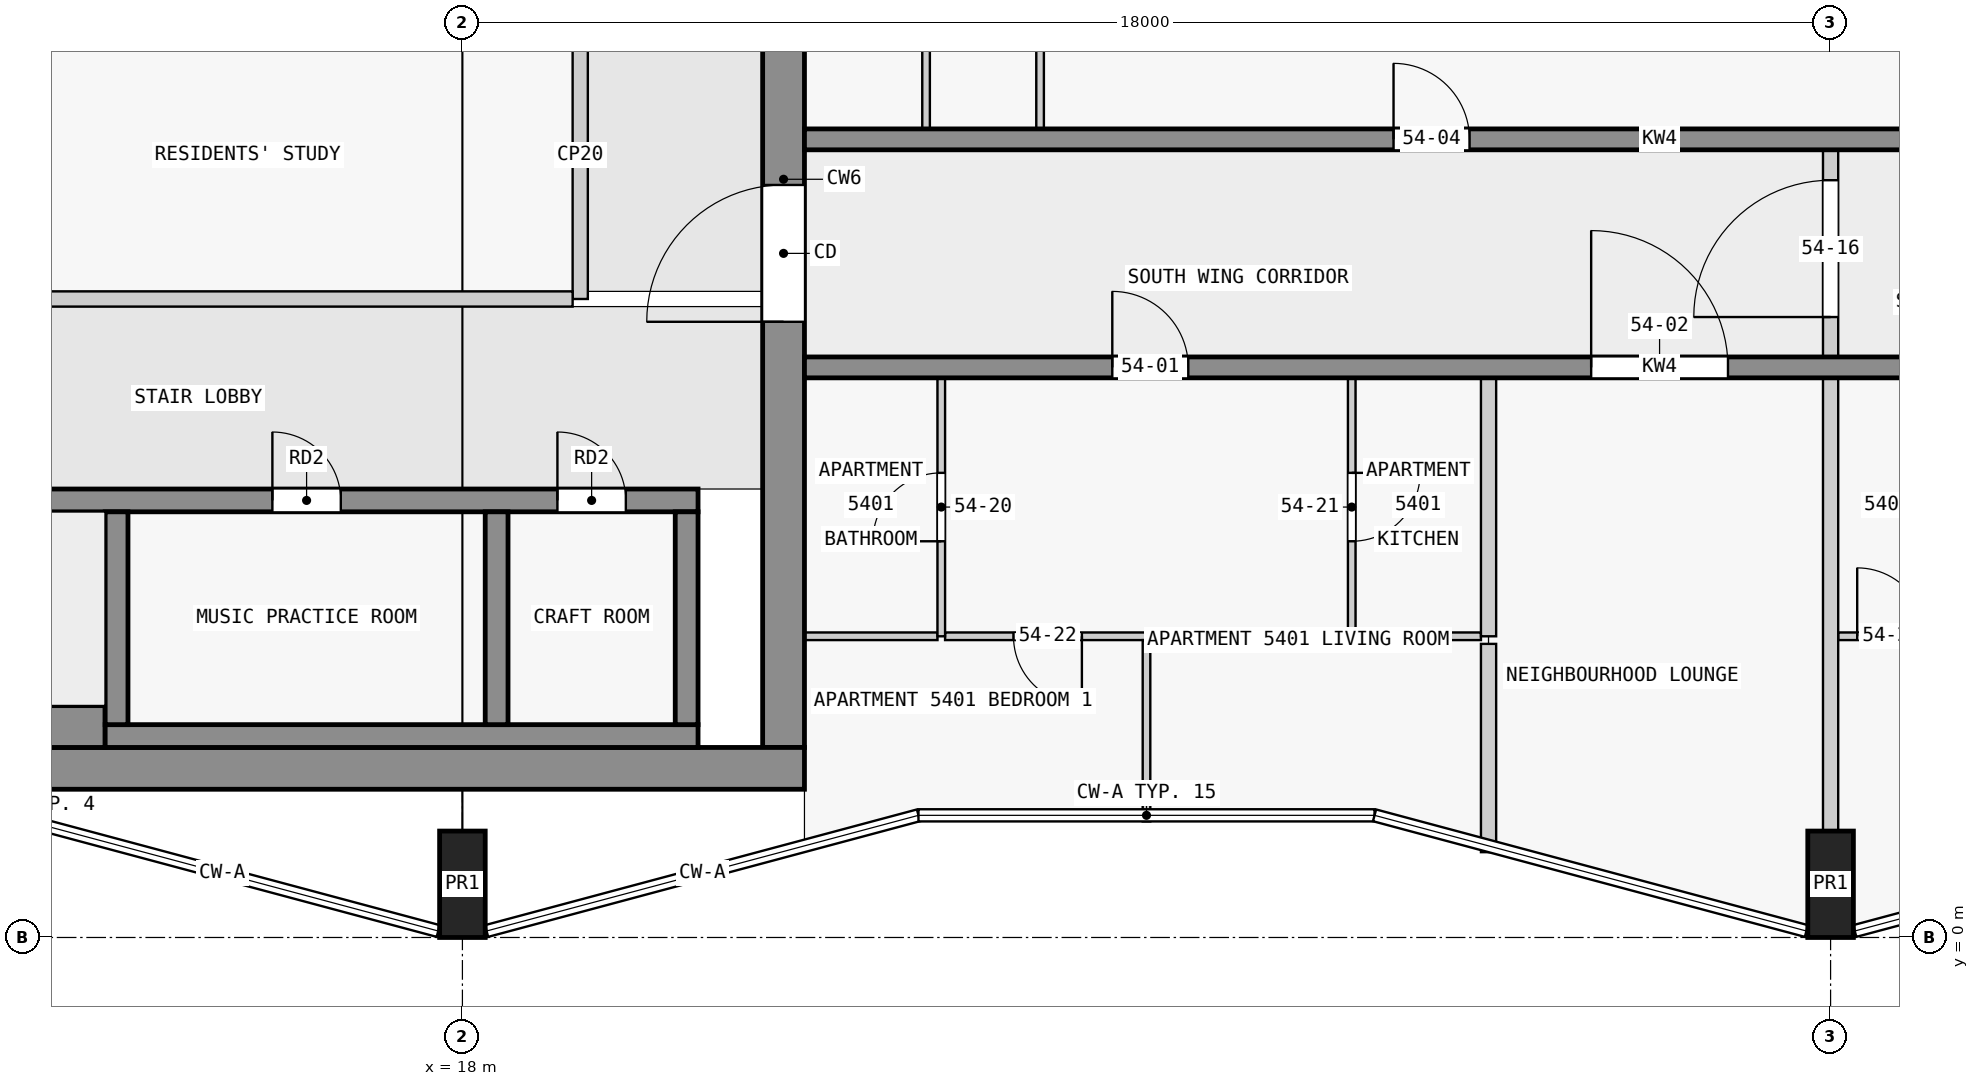
"""IFC4 building model, lengths in metres.
Left out: names, types, materials, properties, quantities, classifications, styles, units other than length and angle.
Written with IfcOpenShell. Run it as: python <this file> out.ifc"""

import sys

from ifc_helpers import new_model, si_unit, direction, frame, frame_2d, origin, origin_2d, place, context, subcontext, project, spatial, rectangle, extrude, element, fill, save


model = new_model("IFC4")
c1 = context("Model", 3, precision=1e-05, world=origin(), true_north=direction((0.0, 1.0)))
c2 = subcontext(c1, "Body", "Model", "MODEL_VIEW")
j1 = project(units=[si_unit("LENGTHUNIT", "METRE"), si_unit("PLANEANGLEUNIT", "RADIAN")], contexts=[c1])
p1 = place(None, origin())
s1 = spatial("IfcSite", under=j1, at=p1, CompositionType="ELEMENT")
p2 = place(p1, origin())
s2 = spatial("IfcBuilding", under=s1, at=p2, CompositionType="ELEMENT")
p3 = place(p2, frame((0.0, 0.0, 208.4)))
s3 = spatial("IfcBuildingStorey", under=s2, at=p3, CompositionType="ELEMENT", Elevation=208.4)
for number, where, z_axis, x_axis in (
    (1, (18.0, 0.7, 0.0), (0.0, 0.0, 1.0), (1.0, 0.0, 0.0)),
    (2, (36.0, 0.7, 0.0), (0.0, 0.0, 1.0), (1.0, 0.0, 0.0)),
):
    element("IfcColumn", number, at=place(p3, frame(where, z_axis=z_axis, x_axis=x_axis)), inside=s3, PredefinedType="COLUMN", context=c2, shape_type="SweptSolid", body=[
        extrude(rectangle(XDim=0.6, YDim=1.4, at=origin_2d()), origin(), (0.0, 0.0, 1.0), 3.5),
    ])
p4 = place(p3, frame((1.75, 2.225, 0.0), z_axis=(0.0, 0.0, 1.0), x_axis=(1.0, 0.0, 0.0)))
e3 = element("IfcWall", 3, at=p4, inside=s3, PredefinedType="SHEAR", context=c2, shape_type="SweptSolid", body=[
    extrude(rectangle(XDim=20.75, YDim=0.55, at=frame_2d((10.375, 0.0))), origin(), (0.0, 0.0, 1.0), 3.25),
])
p5 = place(p3, frame((22.225, 2.5, 0.0), z_axis=(0.0, 0.0, 1.0), x_axis=(0.0, 1.0, 0.0)))
e4 = element("IfcWall", 4, at=p5, inside=s3, PredefinedType="SHEAR", context=c2, shape_type="SweptSolid", body=[
    extrude(rectangle(XDim=14.95, YDim=0.55, at=frame_2d((7.475, 0.0))), origin(), (0.0, 0.0, 1.0), 3.25),
])
p6 = place(p5, frame((5.6, 0.0, 0.0)))
e5 = element("IfcOpeningElement", 5, at=p6, cuts=e4, PredefinedType="OPENING", context=c2, shape_type="SweptSolid", body=[
    extrude(rectangle(XDim=1.8, YDim=2.1, at=frame_2d((0.9, 1.05))), frame((0.0, 0.285, 0.0), z_axis=(0.0, -1.0, 0.0), x_axis=(1.0, 0.0, 0.0)), (0.0, 0.0, 1.0), 0.57),
])
p7 = place(p3, frame((6.9, 2.775, 0.0), z_axis=(0.0, 0.0, 1.0), x_axis=(1.0, 0.0, 0.0)))
e6 = element("IfcWall", 6, at=p7, inside=s3, PredefinedType="SHEAR", context=c2, shape_type="SweptSolid", body=[
    extrude(rectangle(XDim=6.4, YDim=0.55, at=frame_2d((3.2, 0.0))), origin(), (0.0, 0.0, 1.0), 3.25),
])
p8 = place(p3, frame((13.3, 2.65, 0.0), z_axis=(0.0, 0.0, 1.0), x_axis=(1.0, 0.0, 0.0)))
e7 = element("IfcWall", 7, at=p8, inside=s3, PredefinedType="SHEAR", context=c2, shape_type="SweptSolid", body=[
    extrude(rectangle(XDim=7.8, YDim=0.3, at=frame_2d((3.9, 0.0))), origin(), (0.0, 0.0, 1.0), 3.25),
])
for number, where, z_axis, x_axis in (
    (8, (13.45, 2.8, 0.0), (0.0, 0.0, 1.0), (0.0, 1.0, 0.0)),
    (9, (18.45, 2.8, 0.0), (0.0, 0.0, 1.0), (0.0, 1.0, 0.0)),
    (10, (20.95, 2.8, 0.0), (0.0, 0.0, 1.0), (0.0, 1.0, 0.0)),
):
    element("IfcWall", number, at=place(p3, frame(where, z_axis=z_axis, x_axis=x_axis)), inside=s3, PredefinedType="SHEAR", context=c2, shape_type="SweptSolid", body=[
        extrude(rectangle(XDim=2.8, YDim=0.3, at=frame_2d((1.4, 0.0))), origin(), (0.0, 0.0, 1.0), 3.25),
    ])
p9 = place(p3, frame((2.3, 5.75, 0.0), z_axis=(0.0, 0.0, 1.0), x_axis=(1.0, 0.0, 0.0)))
e11 = element("IfcWall", 11, at=p9, inside=s3, PredefinedType="SHEAR", context=c2, shape_type="SweptSolid", body=[
    extrude(rectangle(XDim=18.8, YDim=0.3, at=frame_2d((9.4, 0.0))), origin(), (0.0, 0.0, 1.0), 3.25),
])
p10 = place(p9, frame((4.65, 0.0, 0.0)))
e12 = element("IfcOpeningElement", 12, at=p10, cuts=e11, PredefinedType="OPENING", context=c2, shape_type="SweptSolid", body=[
    extrude(rectangle(XDim=1.1, YDim=2.1, at=frame_2d((0.55, 1.05))), frame((0.0, 0.16, 0.0), z_axis=(0.0, -1.0, 0.0), x_axis=(1.0, 0.0, 0.0)), (0.0, 0.0, 1.0), 0.32),
])
p11 = place(p9, frame((0.45, 0.0, 0.0)))
e13 = element("IfcOpeningElement", 13, at=p11, cuts=e11, PredefinedType="OPENING", context=c2, shape_type="SweptSolid", body=[
    extrude(rectangle(XDim=1.1, YDim=2.1, at=frame_2d((0.55, 1.05))), frame((0.0, 0.16, 0.0), z_axis=(0.0, -1.0, 0.0), x_axis=(1.0, 0.0, 0.0)), (0.0, 0.0, 1.0), 0.32),
])
p12 = place(p9, frame((2.75, 0.0, 0.0)))
e14 = element("IfcOpeningElement", 14, at=p12, cuts=e11, PredefinedType="OPENING", context=c2, shape_type="SweptSolid", body=[
    extrude(rectangle(XDim=1.1, YDim=2.1, at=frame_2d((0.55, 1.05))), frame((0.0, 0.16, 0.0), z_axis=(0.0, -1.0, 0.0), x_axis=(1.0, 0.0, 0.0)), (0.0, 0.0, 1.0), 0.32),
])
p13 = place(p9, frame((13.2, 0.0, 0.0)))
e15 = element("IfcOpeningElement", 15, at=p13, cuts=e11, PredefinedType="OPENING", context=c2, shape_type="SweptSolid", body=[
    extrude(rectangle(XDim=0.9, YDim=2.1, at=frame_2d((0.45, 1.05))), frame((0.0, 0.16, 0.0), z_axis=(0.0, -1.0, 0.0), x_axis=(1.0, 0.0, 0.0)), (0.0, 0.0, 1.0), 0.32),
])
p14 = place(p9, frame((16.95, 0.0, 0.0)))
e16 = element("IfcOpeningElement", 16, at=p14, cuts=e11, PredefinedType="OPENING", context=c2, shape_type="SweptSolid", body=[
    extrude(rectangle(XDim=0.9, YDim=2.1, at=frame_2d((0.45, 1.05))), frame((0.0, 0.16, 0.0), z_axis=(0.0, -1.0, 0.0), x_axis=(1.0, 0.0, 0.0)), (0.0, 0.0, 1.0), 0.32),
])
p15 = place(p3, frame((22.5, 7.5, 0.0), z_axis=(0.0, 0.0, 1.0), x_axis=(1.0, 0.0, 0.0)))
e17 = element("IfcWall", 17, at=p15, inside=s3, PredefinedType="SHEAR", context=c2, shape_type="SweptSolid", body=[
    extrude(rectangle(XDim=22.5, YDim=0.275, at=frame_2d((11.25, 0.0))), origin(), (0.0, 0.0, 1.0), 3.25),
])
p16 = place(p15, frame((4.05, 0.0, 0.0)))
e18 = element("IfcOpeningElement", 18, at=p16, cuts=e17, PredefinedType="OPENING", context=c2, shape_type="SweptSolid", body=[
    extrude(rectangle(XDim=1.0, YDim=2.1, at=frame_2d((0.5, 1.05))), frame((0.0, 0.147, 0.0), z_axis=(0.0, -1.0, 0.0), x_axis=(1.0, 0.0, 0.0)), (0.0, 0.0, 1.0), 0.295),
])
p17 = place(p15, frame((10.35, 0.0, 0.0)))
e19 = element("IfcOpeningElement", 19, at=p17, cuts=e17, PredefinedType="OPENING", context=c2, shape_type="SweptSolid", body=[
    extrude(rectangle(XDim=1.8, YDim=2.1, at=frame_2d((0.9, 1.05))), frame((0.0, 0.147, 0.0), z_axis=(0.0, -1.0, 0.0), x_axis=(1.0, 0.0, 0.0)), (0.0, 0.0, 1.0), 0.295),
])
p18 = place(p15, frame((16.85, 0.0, 0.0)))
e20 = element("IfcOpeningElement", 20, at=p18, cuts=e17, PredefinedType="OPENING", context=c2, shape_type="SweptSolid", body=[
    extrude(rectangle(XDim=1.0, YDim=2.1, at=frame_2d((0.5, 1.05))), frame((0.0, 0.147, 0.0), z_axis=(0.0, -1.0, 0.0), x_axis=(1.0, 0.0, 0.0)), (0.0, 0.0, 1.0), 0.295),
])
p19 = place(p3, frame((22.5, 10.5, 0.0), z_axis=(0.0, 0.0, 1.0), x_axis=(1.0, 0.0, 0.0)))
e21 = element("IfcWall", 21, at=p19, inside=s3, PredefinedType="SHEAR", context=c2, shape_type="SweptSolid", body=[
    extrude(rectangle(XDim=22.5, YDim=0.275, at=frame_2d((11.25, 0.0))), origin(), (0.0, 0.0, 1.0), 3.25),
])
p20 = place(p19, frame((7.75, 0.0, 0.0)))
e22 = element("IfcOpeningElement", 22, at=p20, cuts=e21, PredefinedType="OPENING", context=c2, shape_type="SweptSolid", body=[
    extrude(rectangle(XDim=1.0, YDim=2.1, at=frame_2d((0.5, 1.05))), frame((0.0, 0.147, 0.0), z_axis=(0.0, -1.0, 0.0), x_axis=(1.0, 0.0, 0.0)), (0.0, 0.0, 1.0), 0.295),
])
p21 = place(p19, frame((18.75, 0.0, 0.0)))
e23 = element("IfcOpeningElement", 23, at=p21, cuts=e21, PredefinedType="OPENING", context=c2, shape_type="SweptSolid", body=[
    extrude(rectangle(XDim=0.9, YDim=2.1, at=frame_2d((0.45, 1.05))), frame((0.0, 0.147, 0.0), z_axis=(0.0, -1.0, 0.0), x_axis=(1.0, 0.0, 0.0)), (0.0, 0.0, 1.0), 0.295),
])
p22 = place(p19, frame((20.95, 0.0, 0.0)))
e24 = element("IfcOpeningElement", 24, at=p22, cuts=e21, PredefinedType="OPENING", context=c2, shape_type="SweptSolid", body=[
    extrude(rectangle(XDim=1.0, YDim=2.1, at=frame_2d((0.5, 1.05))), frame((0.0, 0.147, 0.0), z_axis=(0.0, -1.0, 0.0), x_axis=(1.0, 0.0, 0.0)), (0.0, 0.0, 1.0), 0.295),
])
p23 = place(p3, frame((10.9, 8.4, 0.0), z_axis=(0.0, 0.0, 1.0), x_axis=(1.0, 0.0, 0.0)))
e25 = element("IfcWall", 25, at=p23, inside=s3, PredefinedType="PARTITIONING", context=c2, shape_type="SweptSolid", body=[
    extrude(rectangle(XDim=8.55, YDim=0.2, at=frame_2d((4.275, 0.0))), origin(), (0.0, 0.0, 1.0), 3.25),
])
p24 = place(p3, frame((19.55, 8.4, 0.0), z_axis=(0.0, 0.0, 1.0), x_axis=(0.0, 1.0, 0.0)))
e26 = element("IfcWall", 26, at=p24, inside=s3, PredefinedType="PARTITIONING", context=c2, shape_type="SweptSolid", body=[
    extrude(rectangle(XDim=3.8, YDim=0.2, at=frame_2d((1.9, 0.0))), origin(), (0.0, 0.0, 1.0), 3.25),
])
p25 = place(p3, frame((27.0, 3.962, 0.0), z_axis=(0.0, 0.0, 1.0), x_axis=(-1.0, 0.0, 0.0)))
e27 = element("IfcWall", 27, at=p25, inside=s3, PredefinedType="PARTITIONING", context=c2, shape_type="SweptSolid", body=[
    extrude(rectangle(XDim=2.65, YDim=0.1, at=frame_2d((1.325, 0.0))), origin(), (0.0, 0.0, 1.0), 3.25),
])
p26 = place(p25, frame((0.85, 0.0, 0.0)))
e28 = element("IfcOpeningElement", 28, at=p26, cuts=e27, PredefinedType="OPENING", context=c2, shape_type="SweptSolid", body=[
    extrude(rectangle(XDim=0.9, YDim=2.1, at=frame_2d((0.45, 1.05))), frame((0.0, 0.06, 0.0), z_axis=(0.0, -1.0, 0.0), x_axis=(1.0, 0.0, 0.0)), (0.0, 0.0, 1.0), 0.12),
])
p27 = place(p3, frame((22.5, 3.962, 0.0), z_axis=(0.0, 0.0, 1.0), x_axis=(1.0, 0.0, 0.0)))
e29 = element("IfcWall", 29, at=p27, inside=s3, PredefinedType="PARTITIONING", context=c2, shape_type="SweptSolid", body=[
    extrude(rectangle(XDim=1.75, YDim=0.1, at=frame_2d((0.875, 0.0))), origin(), (0.0, 0.0, 1.0), 3.25),
])
p28 = place(p3, frame((29.75, 3.962, 0.0), z_axis=(0.0, 0.0, 1.0), x_axis=(1.0, 0.0, 0.0)))
e30 = element("IfcWall", 30, at=p28, inside=s3, PredefinedType="PARTITIONING", context=c2, shape_type="SweptSolid", body=[
    extrude(rectangle(XDim=1.65, YDim=0.1, at=frame_2d((0.825, 0.0))), origin(), (0.0, 0.0, 1.0), 3.25),
])
p29 = place(p3, frame((36.1, 3.962, 0.0), z_axis=(0.0, 0.0, 1.0), x_axis=(1.0, 0.0, 0.0)))
e31 = element("IfcWall", 31, at=p29, inside=s3, PredefinedType="PARTITIONING", context=c2, shape_type="SweptSolid", body=[
    extrude(rectangle(XDim=1.45, YDim=0.1, at=frame_2d((0.725, 0.0))), origin(), (0.0, 0.0, 1.0), 3.25),
])
p30 = place(p29, frame((0.25, 0.0, 0.0)))
e32 = element("IfcOpeningElement", 32, at=p30, cuts=e31, PredefinedType="OPENING", context=c2, shape_type="SweptSolid", body=[
    extrude(rectangle(XDim=0.9, YDim=2.1, at=frame_2d((0.45, 1.05))), frame((0.0, 0.06, 0.0), z_axis=(0.0, -1.0, 0.0), x_axis=(1.0, 0.0, 0.0)), (0.0, 0.0, 1.0), 0.12),
])
p31 = place(p3, frame((24.1, 10.637, 0.0), z_axis=(0.0, 0.0, 1.0), x_axis=(0.0, 1.0, 0.0)))
e33 = element("IfcWall", 33, at=p31, inside=s3, PredefinedType="PARTITIONING", context=c2, shape_type="SweptSolid", body=[
    extrude(rectangle(XDim=3.4, YDim=0.1, at=frame_2d((1.7, 0.0))), origin(), (0.0, 0.0, 1.0), 3.25),
])
p32 = place(p3, frame((24.3, 3.962, 0.0), z_axis=(0.0, 0.0, 1.0), x_axis=(0.0, 1.0, 0.0)))
e34 = element("IfcWall", 34, at=p32, inside=s3, PredefinedType="PARTITIONING", context=c2, shape_type="SweptSolid", body=[
    extrude(rectangle(XDim=3.4, YDim=0.1, at=frame_2d((1.7, 0.0))), origin(), (0.0, 0.0, 1.0), 3.25),
])
p33 = place(p32, frame((1.25, 0.0, 0.0)))
e35 = element("IfcOpeningElement", 35, at=p33, cuts=e34, PredefinedType="OPENING", context=c2, shape_type="SweptSolid", body=[
    extrude(rectangle(XDim=0.9, YDim=2.1, at=frame_2d((0.45, 1.05))), frame((0.0, 0.06, 0.0), z_axis=(0.0, -1.0, 0.0), x_axis=(1.0, 0.0, 0.0)), (0.0, 0.0, 1.0), 0.12),
])
p34 = place(p3, frame((25.6, 10.637, 0.0), z_axis=(0.0, 0.0, 1.0), x_axis=(0.0, 1.0, 0.0)))
e36 = element("IfcWall", 36, at=p34, inside=s3, PredefinedType="PARTITIONING", context=c2, shape_type="SweptSolid", body=[
    extrude(rectangle(XDim=3.4, YDim=0.1, at=frame_2d((1.7, 0.0))), origin(), (0.0, 0.0, 1.0), 3.25),
])
p35 = place(p34, frame((1.25, 0.0, 0.0)))
e37 = element("IfcOpeningElement", 37, at=p35, cuts=e36, PredefinedType="OPENING", context=c2, shape_type="SweptSolid", body=[
    extrude(rectangle(XDim=0.9, YDim=2.1, at=frame_2d((0.45, 1.05))), frame((0.0, 0.06, 0.0), z_axis=(0.0, -1.0, 0.0), x_axis=(1.0, 0.0, 0.0)), (0.0, 0.0, 1.0), 0.12),
])
p36 = place(p3, frame((27.0, 1.527, 0.0), z_axis=(0.0, 0.0, 1.0), x_axis=(0.0, 1.0, 0.0)))
e38 = element("IfcWall", 38, at=p36, inside=s3, PredefinedType="PARTITIONING", context=c2, shape_type="SweptSolid", body=[
    extrude(rectangle(XDim=2.386, YDim=0.1, at=frame_2d((1.193, 0.0))), origin(), (0.0, 0.0, 1.0), 3.25),
])
p37 = place(p3, frame((29.7, 7.363, 0.0), z_axis=(0.0, 0.0, 1.0), x_axis=(0.0, -1.0, 0.0)))
e39 = element("IfcWall", 39, at=p37, inside=s3, PredefinedType="PARTITIONING", context=c2, shape_type="SweptSolid", body=[
    extrude(rectangle(XDim=3.4, YDim=0.1, at=frame_2d((1.7, 0.0))), origin(), (0.0, 0.0, 1.0), 3.25),
])
p38 = place(p37, frame((1.25, 0.0, 0.0)))
e40 = element("IfcOpeningElement", 40, at=p38, cuts=e39, PredefinedType="OPENING", context=c2, shape_type="SweptSolid", body=[
    extrude(rectangle(XDim=0.9, YDim=2.1, at=frame_2d((0.45, 1.05))), frame((0.0, 0.06, 0.0), z_axis=(0.0, -1.0, 0.0), x_axis=(1.0, 0.0, 0.0)), (0.0, 0.0, 1.0), 0.12),
])
p39 = place(p3, frame((31.5, 3.863, 0.0), z_axis=(0.0, 0.0, 1.0), x_axis=(0.0, -1.0, 0.0)))
e41 = element("IfcWall", 41, at=p39, inside=s3, PredefinedType="PARTITIONING", context=c2, shape_type="SweptSolid", body=[
    extrude(rectangle(XDim=2.74, YDim=0.2, at=frame_2d((1.37, 0.0))), origin(), (0.0, 0.0, 1.0), 3.25),
])
p40 = place(p3, frame((31.5, 3.962, 0.0), z_axis=(0.0, 0.0, 1.0), x_axis=(0.0, 1.0, 0.0)))
e42 = element("IfcWall", 42, at=p40, inside=s3, PredefinedType="PARTITIONING", context=c2, shape_type="SweptSolid", body=[
    extrude(rectangle(XDim=3.4, YDim=0.2, at=frame_2d((1.7, 0.0))), origin(), (0.0, 0.0, 1.0), 3.25),
])
p41 = place(p3, frame((36.0, 1.4, 0.0), z_axis=(0.0, 0.0, 1.0), x_axis=(0.0, 1.0, 0.0)))
e43 = element("IfcWall", 43, at=p41, inside=s3, PredefinedType="PARTITIONING", context=c2, shape_type="SweptSolid", body=[
    extrude(rectangle(XDim=5.963, YDim=0.2, at=frame_2d((2.981, 0.0))), origin(), (0.0, 0.0, 1.0), 3.25),
])
p42 = place(p3, frame((36.0, 7.462, 0.0), z_axis=(0.0, 0.0, 1.0), x_axis=(0.0, 1.0, 0.0)))
e44 = element("IfcWall", 44, at=p42, inside=s3, PredefinedType="PARTITIONING", context=c2, shape_type="SweptSolid", body=[
    extrude(rectangle(XDim=3.175, YDim=0.2, at=frame_2d((1.587, 0.0))), origin(), (0.0, 0.0, 1.0), 3.25),
])
p43 = place(p42, frame((0.7, 0.0, 0.0)))
e45 = element("IfcOpeningElement", 45, at=p43, cuts=e44, PredefinedType="OPENING", context=c2, shape_type="SweptSolid", body=[
    extrude(rectangle(XDim=1.8, YDim=2.1, at=frame_2d((0.9, 1.05))), frame((0.0, 0.11, 0.0), z_axis=(0.0, -1.0, 0.0), x_axis=(1.0, 0.0, 0.0)), (0.0, 0.0, 1.0), 0.22),
])
p44 = place(p6, origin())
e46 = element("IfcDoor", 46, at=p44, inside=s3, OperationType="DOUBLE_DOOR_SINGLE_SWING", PredefinedType="DOOR", context=c2, shape_type="SweptSolid", body=[
    extrude(rectangle(XDim=1.8, YDim=2.1, at=frame_2d((0.9, 1.05))), frame((0.0, 0.025, 0.0), z_axis=(0.0, -1.0, 0.0), x_axis=(1.0, 0.0, 0.0)), (0.0, 0.0, 1.0), 0.05),
])
fill(e5, e46)
p45 = place(p13, origin())
e47 = element("IfcDoor", 47, at=p45, inside=s3, OperationType="SINGLE_SWING_LEFT", PredefinedType="DOOR", context=c2, shape_type="SweptSolid", body=[
    extrude(rectangle(XDim=0.9, YDim=2.1, at=frame_2d((0.45, 1.05))), frame((0.0, 0.025, 0.0), z_axis=(0.0, -1.0, 0.0), x_axis=(1.0, 0.0, 0.0)), (0.0, 0.0, 1.0), 0.05),
])
fill(e15, e47)
p46 = place(p14, origin())
e48 = element("IfcDoor", 48, at=p46, inside=s3, OperationType="SINGLE_SWING_LEFT", PredefinedType="DOOR", context=c2, shape_type="SweptSolid", body=[
    extrude(rectangle(XDim=0.9, YDim=2.1, at=frame_2d((0.45, 1.05))), frame((0.0, 0.025, 0.0), z_axis=(0.0, -1.0, 0.0), x_axis=(1.0, 0.0, 0.0)), (0.0, 0.0, 1.0), 0.05),
])
fill(e16, e48)
p47 = place(p16, origin())
e49 = element("IfcDoor", 49, at=p47, inside=s3, OperationType="SINGLE_SWING_LEFT", PredefinedType="DOOR", context=c2, shape_type="SweptSolid", body=[
    extrude(rectangle(XDim=1.0, YDim=2.1, at=frame_2d((0.5, 1.05))), frame((0.0, 0.025, 0.0), z_axis=(0.0, -1.0, 0.0), x_axis=(1.0, 0.0, 0.0)), (0.0, 0.0, 1.0), 0.05),
])
fill(e18, e49)
p48 = place(p17, origin())
e50 = element("IfcDoor", 50, at=p48, inside=s3, OperationType="SINGLE_SWING_LEFT", PredefinedType="DOOR", context=c2, shape_type="SweptSolid", body=[
    extrude(rectangle(XDim=1.8, YDim=2.1, at=frame_2d((0.9, 1.05))), frame((0.0, 0.025, 0.0), z_axis=(0.0, -1.0, 0.0), x_axis=(1.0, 0.0, 0.0)), (0.0, 0.0, 1.0), 0.05),
])
fill(e19, e50)
p49 = place(p20, origin())
e51 = element("IfcDoor", 51, at=p49, inside=s3, OperationType="SINGLE_SWING_LEFT", PredefinedType="DOOR", context=c2, shape_type="SweptSolid", body=[
    extrude(rectangle(XDim=1.0, YDim=2.1, at=frame_2d((0.5, 1.05))), frame((0.0, 0.025, 0.0), z_axis=(0.0, -1.0, 0.0), x_axis=(1.0, 0.0, 0.0)), (0.0, 0.0, 1.0), 0.05),
])
fill(e22, e51)
p50 = place(p43, origin())
e52 = element("IfcDoor", 52, at=p50, inside=s3, OperationType="SINGLE_SWING_RIGHT", PredefinedType="DOOR", context=c2, shape_type="SweptSolid", body=[
    extrude(rectangle(XDim=1.8, YDim=2.1, at=frame_2d((0.9, 1.05))), frame((0.0, 0.025, 0.0), z_axis=(0.0, -1.0, 0.0), x_axis=(1.0, 0.0, 0.0)), (0.0, 0.0, 1.0), 0.05),
])
fill(e45, e52)
p51 = place(p33, origin())
e53 = element("IfcDoor", 53, at=p51, inside=s3, OperationType="SINGLE_SWING_LEFT", PredefinedType="DOOR", context=c2, shape_type="SweptSolid", body=[
    extrude(rectangle(XDim=0.9, YDim=2.1, at=frame_2d((0.45, 1.05))), frame((0.0, 0.025, 0.0), z_axis=(0.0, -1.0, 0.0), x_axis=(1.0, 0.0, 0.0)), (0.0, 0.0, 1.0), 0.05),
])
fill(e35, e53)
p52 = place(p38, origin())
e54 = element("IfcDoor", 54, at=p52, inside=s3, OperationType="SINGLE_SWING_LEFT", PredefinedType="DOOR", context=c2, shape_type="SweptSolid", body=[
    extrude(rectangle(XDim=0.9, YDim=2.1, at=frame_2d((0.45, 1.05))), frame((0.0, 0.025, 0.0), z_axis=(0.0, -1.0, 0.0), x_axis=(1.0, 0.0, 0.0)), (0.0, 0.0, 1.0), 0.05),
])
fill(e40, e54)
p53 = place(p26, origin())
e55 = element("IfcDoor", 55, at=p53, inside=s3, OperationType="SINGLE_SWING_LEFT", PredefinedType="DOOR", context=c2, shape_type="SweptSolid", body=[
    extrude(rectangle(XDim=0.9, YDim=2.1, at=frame_2d((0.45, 1.05))), frame((0.0, 0.025, 0.0), z_axis=(0.0, -1.0, 0.0), x_axis=(1.0, 0.0, 0.0)), (0.0, 0.0, 1.0), 0.05),
])
fill(e28, e55)
p54 = place(p30, origin())
e56 = element("IfcDoor", 56, at=p54, inside=s3, OperationType="SINGLE_SWING_LEFT", PredefinedType="DOOR", context=c2, shape_type="SweptSolid", body=[
    extrude(rectangle(XDim=0.9, YDim=2.1, at=frame_2d((0.45, 1.05))), frame((0.0, 0.025, 0.0), z_axis=(0.0, -1.0, 0.0), x_axis=(1.0, 0.0, 0.0)), (0.0, 0.0, 1.0), 0.05),
])
fill(e32, e56)
save(model, sys.argv[1])
